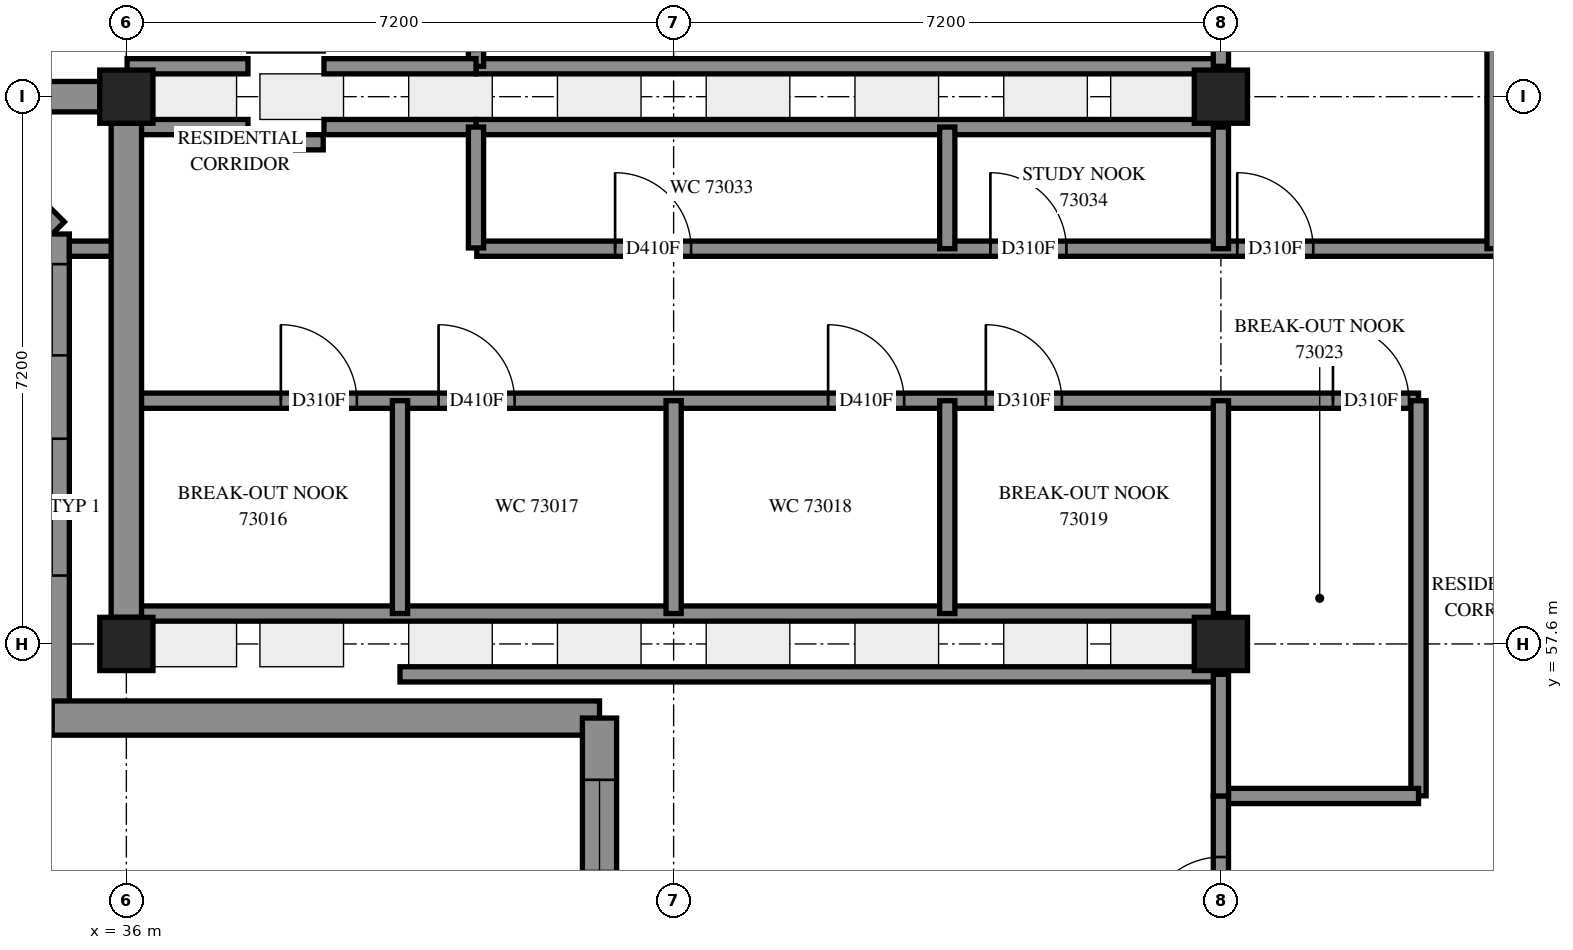
"""IFC4 building model, lengths in metres.
Left out: names, types, materials, properties, quantities, classifications, styles, units other than length and angle.
Written with IfcOpenShell. Run it as: python <this file> out.ifc"""

import sys

from ifc_helpers import new_model, si_unit, direction, frame, frame_2d, origin, origin_2d, place, context, subcontext, project, spatial, polyline, rectangle, outline, extrude, element, fill, save


model = new_model("IFC4")
c1 = context("Model", 3, precision=1e-05, world=origin(), true_north=direction((0.0, 1.0)))
c2 = subcontext(c1, "Body", "Model", "MODEL_VIEW")
j1 = project(units=[si_unit("LENGTHUNIT", "METRE"), si_unit("PLANEANGLEUNIT", "RADIAN")], contexts=[c1])
p1 = place(None, origin())
s1 = spatial("IfcSite", under=j1, at=p1, CompositionType="ELEMENT")
p2 = place(p1, origin())
s2 = spatial("IfcBuilding", under=s1, at=p2, CompositionType="ELEMENT")
p3 = place(p2, frame((0.0, 0.0, 267.6)))
s3 = spatial("IfcBuildingStorey", under=s2, at=p3, CompositionType="ELEMENT", Elevation=267.6)
for number, where, z_axis, x_axis in (
    (1, (36.0, 57.6, 0.0), (0.0, 0.0, 1.0), (1.0, 0.0, 0.0)),
    (2, (36.0, 64.8, 0.0), (0.0, 0.0, 1.0), (1.0, 0.0, 0.0)),
    (3, (50.4, 57.6, 0.0), (0.0, 0.0, 1.0), (1.0, 0.0, 0.0)),
    (4, (50.4, 64.8, 0.0), (0.0, 0.0, 1.0), (1.0, 0.0, 0.0)),
):
    element("IfcColumn", number, at=place(p3, frame(where, z_axis=z_axis, x_axis=x_axis)), inside=s3, PredefinedType="COLUMN", context=c2, shape_type="SweptSolid", body=[
        extrude(rectangle(XDim=0.7, YDim=0.7, at=origin_2d()), origin(), (0.0, 0.0, 1.0), 3.1),
    ])
p4 = place(p3, frame((34.193, 63.825, 0.0), z_axis=(0.0, 0.0, 1.0), x_axis=(0.7071067812, -0.7071067812, 0.0)))
e5 = element("IfcWall", 5, at=p4, inside=s3, PredefinedType="SOLIDWALL", context=c2, shape_type="SweptSolid", body=[
    extrude(outline(polyline([(0.093, -0.225), (1.083, -0.225), (1.27, 0.225), (-0.093, 0.225), (0.093, -0.225)])), origin(), (0.0, 0.0, 1.0), 3.1),
])
p5 = place(p3, frame((35.025, 62.993, 0.0), z_axis=(0.0, 0.0, 1.0), x_axis=(0.0, -1.0, 0.0)))
e6 = element("IfcWall", 6, at=p5, inside=s3, PredefinedType="SOLIDWALL", context=c2, shape_type="SweptSolid", body=[
    extrude(outline(polyline([(0.093, -0.225), (6.593, -0.225), (6.143, 0.225), (-0.093, 0.225), (0.093, -0.225)])), origin(), (0.0, 0.0, 1.0), 3.1),
])
p6 = place(p5, frame((0.397, 0.0, 0.45)))
e7 = element("IfcOpeningElement", 7, at=p6, cuts=e6, PredefinedType="OPENING", context=c2, shape_type="SweptSolid", body=[
    extrude(rectangle(XDim=1.2, YDim=2.55, at=frame_2d((0.6, 1.275))), frame((0.0, 0.235, 0.0), z_axis=(0.0, -1.0, 0.0), x_axis=(1.0, 0.0, 0.0)), (0.0, 0.0, 1.0), 0.47),
])
p7 = place(p5, frame((2.693, 0.0, 0.7)))
e8 = element("IfcOpeningElement", 8, at=p7, cuts=e6, PredefinedType="OPENING", context=c2, shape_type="SweptSolid", body=[
    extrude(rectangle(XDim=1.8, YDim=2.3, at=frame_2d((0.9, 1.15))), frame((0.0, 0.235, 0.0), z_axis=(0.0, -1.0, 0.0), x_axis=(1.0, 0.0, 0.0)), (0.0, 0.0, 1.0), 0.47),
])
p8 = place(p3, frame((35.025, 56.625, 0.0), z_axis=(0.0, 0.0, 1.0), x_axis=(1.0, 0.0, 0.0)))
e9 = element("IfcWall", 9, at=p8, inside=s3, PredefinedType="SOLIDWALL", context=c2, shape_type="SweptSolid", body=[
    extrude(outline(polyline([(-0.225, -0.225), (6.975, -0.225), (7.425, 0.225), (0.225, 0.225), (-0.225, -0.225)])), origin(), (0.0, 0.0, 1.0), 3.1),
])
p9 = place(p3, frame((42.225, 56.625, 0.0), z_axis=(0.0, 0.0, 1.0), x_axis=(0.0, -1.0, 0.0)))
e10 = element("IfcWall", 10, at=p9, inside=s3, PredefinedType="SOLIDWALL", context=c2, shape_type="SweptSolid", body=[
    extrude(outline(polyline([(0.225, -0.225), (7.425, -0.225), (6.975, 0.225), (-0.225, 0.225), (0.225, -0.225)])), origin(), (0.0, 0.0, 1.0), 3.1),
])
p10 = place(p9, frame((3.025, 0.0, 0.45)))
e11 = element("IfcOpeningElement", 11, at=p10, cuts=e10, PredefinedType="OPENING", context=c2, shape_type="SweptSolid", body=[
    extrude(rectangle(XDim=2.8, YDim=2.55, at=frame_2d((1.4, 1.275))), frame((0.0, 0.235, 0.0), z_axis=(0.0, -1.0, 0.0), x_axis=(1.0, 0.0, 0.0)), (0.0, 0.0, 1.0), 0.47),
])
p11 = place(p9, frame((0.812, 0.0, 0.45)))
e12 = element("IfcOpeningElement", 12, at=p11, cuts=e10, PredefinedType="OPENING", context=c2, shape_type="SweptSolid", body=[
    extrude(rectangle(XDim=1.2, YDim=2.55, at=frame_2d((0.6, 1.275))), frame((0.0, 0.235, 0.0), z_axis=(0.0, -1.0, 0.0), x_axis=(1.0, 0.0, 0.0)), (0.0, 0.0, 1.0), 0.47),
])
p12 = place(p3, frame((36.0, 60.8, 0.0), z_axis=(0.0, 0.0, 1.0), x_axis=(1.0, 0.0, 0.0)))
e13 = element("IfcWall", 13, at=p12, inside=s3, PredefinedType="PARTITIONING", context=c2, shape_type="SweptSolid", body=[
    extrude(rectangle(XDim=17.0, YDim=0.2, at=frame_2d((8.5, 0.0))), origin(), (0.0, 0.0, 1.0), 3.1),
])
p13 = place(p12, frame((2.033, 0.0, 0.0)))
e14 = element("IfcOpeningElement", 14, at=p13, cuts=e13, PredefinedType="OPENING", context=c2, shape_type="SweptSolid", body=[
    extrude(rectangle(XDim=1.0, YDim=2.1, at=frame_2d((0.5, 1.05))), frame((0.0, 0.11, 0.0), z_axis=(0.0, -1.0, 0.0), x_axis=(1.0, 0.0, 0.0)), (0.0, 0.0, 1.0), 0.22),
])
p14 = place(p12, frame((4.107, 0.0, 0.0)))
e15 = element("IfcOpeningElement", 15, at=p14, cuts=e13, PredefinedType="OPENING", context=c2, shape_type="SweptSolid", body=[
    extrude(rectangle(XDim=1.0, YDim=2.1, at=frame_2d((0.5, 1.05))), frame((0.0, 0.11, 0.0), z_axis=(0.0, -1.0, 0.0), x_axis=(1.0, 0.0, 0.0)), (0.0, 0.0, 1.0), 0.22),
])
p15 = place(p12, frame((9.232, 0.0, 0.0)))
e16 = element("IfcOpeningElement", 16, at=p15, cuts=e13, PredefinedType="OPENING", context=c2, shape_type="SweptSolid", body=[
    extrude(rectangle(XDim=1.0, YDim=2.1, at=frame_2d((0.5, 1.05))), frame((0.0, 0.11, 0.0), z_axis=(0.0, -1.0, 0.0), x_axis=(1.0, 0.0, 0.0)), (0.0, 0.0, 1.0), 0.22),
])
p16 = place(p12, frame((11.307, 0.0, 0.0)))
e17 = element("IfcOpeningElement", 17, at=p16, cuts=e13, PredefinedType="OPENING", context=c2, shape_type="SweptSolid", body=[
    extrude(rectangle(XDim=1.0, YDim=2.1, at=frame_2d((0.5, 1.05))), frame((0.0, 0.11, 0.0), z_axis=(0.0, -1.0, 0.0), x_axis=(1.0, 0.0, 0.0)), (0.0, 0.0, 1.0), 0.22),
])
p17 = place(p12, frame((15.874, 0.0, 0.0)))
e18 = element("IfcOpeningElement", 18, at=p17, cuts=e13, PredefinedType="OPENING", context=c2, shape_type="SweptSolid", body=[
    extrude(rectangle(XDim=1.0, YDim=2.1, at=frame_2d((0.5, 1.05))), frame((0.0, 0.11, 0.0), z_axis=(0.0, -1.0, 0.0), x_axis=(1.0, 0.0, 0.0)), (0.0, 0.0, 1.0), 0.22),
])
p18 = place(p3, frame((40.61, 62.8, 0.0), z_axis=(0.0, 0.0, 1.0), x_axis=(1.0, 0.0, 0.0)))
e19 = element("IfcWall", 19, at=p18, inside=s3, PredefinedType="PARTITIONING", context=c2, shape_type="SweptSolid", body=[
    extrude(rectangle(XDim=14.59, YDim=0.2, at=frame_2d((7.295, 0.0))), origin(), (0.0, 0.0, 1.0), 3.1),
])
p19 = place(p18, frame((1.82, 0.0, 0.0)))
e20 = element("IfcOpeningElement", 20, at=p19, cuts=e19, PredefinedType="OPENING", context=c2, shape_type="SweptSolid", body=[
    extrude(rectangle(XDim=1.0, YDim=2.1, at=frame_2d((0.5, 1.05))), frame((0.0, 0.11, 0.0), z_axis=(0.0, -1.0, 0.0), x_axis=(1.0, 0.0, 0.0)), (0.0, 0.0, 1.0), 0.22),
])
p20 = place(p18, frame((6.758, 0.0, 0.0)))
e21 = element("IfcOpeningElement", 21, at=p20, cuts=e19, PredefinedType="OPENING", context=c2, shape_type="SweptSolid", body=[
    extrude(rectangle(XDim=1.0, YDim=2.1, at=frame_2d((0.5, 1.05))), frame((0.0, 0.11, 0.0), z_axis=(0.0, -1.0, 0.0), x_axis=(1.0, 0.0, 0.0)), (0.0, 0.0, 1.0), 0.22),
])
p21 = place(p18, frame((10.005, 0.0, 0.0)))
e22 = element("IfcOpeningElement", 22, at=p21, cuts=e19, PredefinedType="OPENING", context=c2, shape_type="SweptSolid", body=[
    extrude(rectangle(XDim=1.0, YDim=2.1, at=frame_2d((0.5, 1.05))), frame((0.0, 0.11, 0.0), z_axis=(0.0, -1.0, 0.0), x_axis=(1.0, 0.0, 0.0)), (0.0, 0.0, 1.0), 0.22),
])
p22 = place(p3, frame((36.0, 58.0, 0.0), z_axis=(0.0, 0.0, 1.0), x_axis=(1.0, 0.0, 0.0)))
e23 = element("IfcWall", 23, at=p22, inside=s3, PredefinedType="PARTITIONING", context=c2, shape_type="SweptSolid", body=[
    extrude(rectangle(XDim=14.4, YDim=0.2, at=frame_2d((7.2, 0.0))), origin(), (0.0, 0.0, 1.0), 3.1),
])
p23 = place(p3, frame((39.6, 57.2, 0.0), z_axis=(0.0, 0.0, 1.0), x_axis=(1.0, 0.0, 0.0)))
e24 = element("IfcWall", 24, at=p23, inside=s3, PredefinedType="PARTITIONING", context=c2, shape_type="SweptSolid", body=[
    extrude(rectangle(XDim=10.8, YDim=0.2, at=frame_2d((5.4, 0.0))), origin(), (0.0, 0.0, 1.0), 3.1),
])
p24 = place(p3, frame((54.0, 62.8, 0.0), z_axis=(0.0, 0.0, 1.0), x_axis=(0.0, 1.0, 0.0)))
e25 = element("IfcWall", 25, at=p24, inside=s3, PredefinedType="PARTITIONING", context=c2, shape_type="SweptSolid", body=[
    extrude(rectangle(XDim=10.036, YDim=0.2, at=frame_2d((5.018, 0.0))), origin(), (0.0, 0.0, 1.0), 3.1),
])
for number, where, z_axis, x_axis in (
    (26, (40.6, 64.4, 0.0), (0.0, 0.0, 1.0), (1.0, 0.0, 0.0)),
    (27, (40.6, 65.2, 0.0), (0.0, 0.0, 1.0), (1.0, 0.0, 0.0)),
):
    element("IfcWall", number, at=place(p3, frame(where, z_axis=z_axis, x_axis=x_axis)), inside=s3, PredefinedType="PARTITIONING", context=c2, shape_type="SweptSolid", body=[
        extrude(rectangle(XDim=9.8, YDim=0.2, at=frame_2d((4.9, 0.0))), origin(), (0.0, 0.0, 1.0), 3.1),
    ])
p25 = place(p3, frame((50.4, 65.2, 0.0), z_axis=(0.0, 0.0, 1.0), x_axis=(0.0, 1.0, 0.0)))
e28 = element("IfcWall", 28, at=p25, inside=s3, PredefinedType="PARTITIONING", context=c2, shape_type="SweptSolid", body=[
    extrude(rectangle(XDim=6.4, YDim=0.2, at=frame_2d((3.2, 0.0))), origin(), (0.0, 0.0, 1.0), 3.1),
])
p26 = place(p3, frame((53.0, 55.602, 0.0), z_axis=(0.0, 0.0, 1.0), x_axis=(0.0, 1.0, 0.0)))
e29 = element("IfcWall", 29, at=p26, inside=s3, PredefinedType="PARTITIONING", context=c2, shape_type="SweptSolid", body=[
    extrude(rectangle(XDim=5.198, YDim=0.2, at=frame_2d((2.599, 0.0))), origin(), (0.0, 0.0, 1.0), 3.1),
])
p27 = place(p3, frame((36.0, 58.0, 0.0), z_axis=(0.0, 0.0, 1.0), x_axis=(0.0, 1.0, 0.0)))
e30 = element("IfcWall", 30, at=p27, inside=s3, PredefinedType="PARTITIONING", context=c2, shape_type="SweptSolid", body=[
    extrude(rectangle(XDim=2.8, YDim=0.2, at=frame_2d((1.4, 0.0))), origin(), (0.0, 0.0, 1.0), 2.6),
])
for number, where, z_axis, x_axis in (
    (31, (39.6, 58.0, 0.0), (0.0, 0.0, 1.0), (0.0, 1.0, 0.0)),
    (32, (43.2, 58.0, 0.0), (0.0, 0.0, 1.0), (0.0, 1.0, 0.0)),
    (33, (46.8, 58.0, 0.0), (0.0, 0.0, 1.0), (0.0, 1.0, 0.0)),
    (34, (50.4, 58.0, 0.0), (0.0, 0.0, 1.0), (0.0, 1.0, 0.0)),
):
    element("IfcWall", number, at=place(p3, frame(where, z_axis=z_axis, x_axis=x_axis)), inside=s3, PredefinedType="PARTITIONING", context=c2, shape_type="SweptSolid", body=[
        extrude(rectangle(XDim=2.8, YDim=0.2, at=frame_2d((1.4, 0.0))), origin(), (0.0, 0.0, 1.0), 3.1),
    ])
p28 = place(p3, frame((50.4, 55.6, 0.0), z_axis=(0.0, 0.0, 1.0), x_axis=(1.0, 0.0, 0.0)))
e35 = element("IfcWall", 35, at=p28, inside=s3, PredefinedType="PARTITIONING", context=c2, shape_type="SweptSolid", body=[
    extrude(rectangle(XDim=2.6, YDim=0.2, at=frame_2d((1.3, 0.0))), origin(), (0.0, 0.0, 1.0), 3.1),
])
p29 = place(p3, frame((40.6, 65.2, 0.0), z_axis=(0.0, 0.0, 1.0), x_axis=(0.0, 1.0, 0.0)))
e36 = element("IfcWall", 36, at=p29, inside=s3, PredefinedType="PARTITIONING", context=c2, shape_type="SweptSolid", body=[
    extrude(rectangle(XDim=2.298, YDim=0.2, at=frame_2d((1.149, 0.0))), origin(), (0.0, 0.0, 1.0), 3.1),
])
p30 = place(p29, frame((0.203, 0.0, 0.0)))
e37 = element("IfcOpeningElement", 37, at=p30, cuts=e36, PredefinedType="OPENING", context=c2, shape_type="SweptSolid", body=[
    extrude(rectangle(XDim=1.0, YDim=2.1, at=frame_2d((0.5, 1.05))), frame((0.0, 0.11, 0.0), z_axis=(0.0, -1.0, 0.0), x_axis=(1.0, 0.0, 0.0)), (0.0, 0.0, 1.0), 0.22),
])
for number, where, z_axis, x_axis in (
    (38, (38.6, 64.4, 0.0), (0.0, 0.0, 1.0), (1.0, 0.0, 0.0)),
    (39, (38.6, 65.2, 0.0), (0.0, 0.0, 1.0), (1.0, 0.0, 0.0)),
):
    element("IfcWall", number, at=place(p3, frame(where, z_axis=z_axis, x_axis=x_axis)), inside=s3, PredefinedType="PARTITIONING", context=c2, shape_type="SweptSolid", body=[
        extrude(rectangle(XDim=2.0, YDim=0.2, at=frame_2d((1.0, 0.0))), origin(), (0.0, 0.0, 1.0), 3.1),
    ])
p31 = place(p3, frame((50.4, 53.6, 0.0), z_axis=(0.0, 0.0, 1.0), x_axis=(0.0, 1.0, 0.0)))
e40 = element("IfcWall", 40, at=p31, inside=s3, PredefinedType="PARTITIONING", context=c2, shape_type="SweptSolid", body=[
    extrude(rectangle(XDim=2.0, YDim=0.2, at=frame_2d((1.0, 0.0))), origin(), (0.0, 0.0, 1.0), 3.1),
])
p32 = place(p31, frame((0.197, 0.0, 0.0)))
e41 = element("IfcOpeningElement", 41, at=p32, cuts=e40, PredefinedType="OPENING", context=c2, shape_type="SweptSolid", body=[
    extrude(rectangle(XDim=1.0, YDim=2.1, at=frame_2d((0.5, 1.05))), frame((0.0, 0.11, 0.0), z_axis=(0.0, -1.0, 0.0), x_axis=(1.0, 0.0, 0.0)), (0.0, 0.0, 1.0), 0.22),
])
p33 = place(p3, frame((36.0, 60.8, 0.0), z_axis=(0.0, 0.0, 1.0), x_axis=(0.0, 1.0, 0.0)))
e42 = element("IfcWall", 42, at=p33, inside=s3, PredefinedType="PARTITIONING", context=c2, shape_type="SweptSolid", body=[
    extrude(rectangle(XDim=1.988, YDim=0.2, at=frame_2d((0.994, 0.0))), origin(), (0.0, 0.0, 1.0), 2.6),
])
for number, where, z_axis, x_axis in (
    (43, (46.8, 62.8, 0.0), (0.0, 0.0, 1.0), (0.0, 1.0, 0.0)),
    (44, (50.4, 62.8, 0.0), (0.0, 0.0, 1.0), (0.0, 1.0, 0.0)),
    (45, (50.4, 55.6, 0.0), (0.0, 0.0, 1.0), (0.0, 1.0, 0.0)),
):
    element("IfcWall", number, at=place(p3, frame(where, z_axis=z_axis, x_axis=x_axis)), inside=s3, PredefinedType="PARTITIONING", context=c2, shape_type="SweptSolid", body=[
        extrude(rectangle(XDim=1.6, YDim=0.2, at=frame_2d((0.8, 0.0))), origin(), (0.0, 0.0, 1.0), 3.1),
    ])
for number, where, z_axis, x_axis in (
    (46, (36.01, 64.4, 0.0), (0.0, 0.0, 1.0), (1.0, 0.0, 0.0)),
    (47, (36.01, 65.2, 0.0), (0.0, 0.0, 1.0), (1.0, 0.0, 0.0)),
    (48, (40.6, 62.81, 0.0), (0.0, 0.0, 1.0), (0.0, 1.0, 0.0)),
):
    element("IfcWall", number, at=place(p3, frame(where, z_axis=z_axis, x_axis=x_axis)), inside=s3, PredefinedType="PARTITIONING", context=c2, shape_type="SweptSolid", body=[
        extrude(rectangle(XDim=1.59, YDim=0.2, at=frame_2d((0.795, 0.0))), origin(), (0.0, 0.0, 1.0), 3.1),
    ])
p34 = place(p3, frame((37.61, 64.2, 0.0), z_axis=(0.0, 0.0, 1.0), x_axis=(1.0, 0.0, 0.0)))
e49 = element("IfcWall", 49, at=p34, inside=s3, PredefinedType="PARTITIONING", context=c2, shape_type="SweptSolid", body=[
    extrude(rectangle(XDim=0.98, YDim=0.2, at=frame_2d((0.49, 0.0))), origin(), (0.0, 0.0, 1.0), 3.1),
])
p35 = place(p3, frame((35.25, 62.8, 0.0), z_axis=(0.0, 0.0, 1.0), x_axis=(1.0, 0.0, 0.0)))
e50 = element("IfcWall", 50, at=p35, inside=s3, PredefinedType="PARTITIONING", context=c2, shape_type="SweptSolid", body=[
    extrude(rectangle(XDim=0.74, YDim=0.2, at=frame_2d((0.37, 0.0))), origin(), (0.0, 0.0, 1.0), 3.1),
])
p36 = place(p6, origin())
e51 = element("IfcWindow", 51, at=p36, inside=s3, PartitioningType="SINGLE_PANEL", PredefinedType="WINDOW", context=c2, shape_type="SweptSolid", body=[
    extrude(rectangle(XDim=1.2, YDim=2.55, at=frame_2d((0.6, 1.275))), frame((0.0, 0.205, 0.0), z_axis=(0.0, -1.0, 0.0), x_axis=(1.0, 0.0, 0.0)), (0.0, 0.0, 1.0), 0.06),
])
fill(e7, e51)
p37 = place(p11, origin())
e52 = element("IfcWindow", 52, at=p37, inside=s3, PartitioningType="SINGLE_PANEL", PredefinedType="WINDOW", context=c2, shape_type="SweptSolid", body=[
    extrude(rectangle(XDim=1.2, YDim=2.55, at=frame_2d((0.6, 1.275))), frame((0.0, 0.205, 0.0), z_axis=(0.0, -1.0, 0.0), x_axis=(1.0, 0.0, 0.0)), (0.0, 0.0, 1.0), 0.06),
])
fill(e12, e52)
p38 = place(p13, origin())
e53 = element("IfcDoor", 53, at=p38, inside=s3, OperationType="SINGLE_SWING_LEFT", PredefinedType="DOOR", context=c2, shape_type="SweptSolid", body=[
    extrude(rectangle(XDim=1.0, YDim=2.1, at=frame_2d((0.5, 1.05))), frame((0.0, 0.025, 0.0), z_axis=(0.0, -1.0, 0.0), x_axis=(1.0, 0.0, 0.0)), (0.0, 0.0, 1.0), 0.05),
])
fill(e14, e53)
p39 = place(p14, origin())
e54 = element("IfcDoor", 54, at=p39, inside=s3, OperationType="SINGLE_SWING_RIGHT", PredefinedType="DOOR", context=c2, shape_type="SweptSolid", body=[
    extrude(rectangle(XDim=1.0, YDim=2.1, at=frame_2d((0.5, 1.05))), frame((0.0, 0.025, 0.0), z_axis=(0.0, -1.0, 0.0), x_axis=(1.0, 0.0, 0.0)), (0.0, 0.0, 1.0), 0.05),
])
fill(e15, e54)
p40 = place(p15, origin())
e55 = element("IfcDoor", 55, at=p40, inside=s3, OperationType="SINGLE_SWING_LEFT", PredefinedType="DOOR", context=c2, shape_type="SweptSolid", body=[
    extrude(rectangle(XDim=1.0, YDim=2.1, at=frame_2d((0.5, 1.05))), frame((0.0, 0.025, 0.0), z_axis=(0.0, -1.0, 0.0), x_axis=(1.0, 0.0, 0.0)), (0.0, 0.0, 1.0), 0.05),
])
fill(e16, e55)
p41 = place(p16, origin())
e56 = element("IfcDoor", 56, at=p41, inside=s3, OperationType="SINGLE_SWING_RIGHT", PredefinedType="DOOR", context=c2, shape_type="SweptSolid", body=[
    extrude(rectangle(XDim=1.0, YDim=2.1, at=frame_2d((0.5, 1.05))), frame((0.0, 0.025, 0.0), z_axis=(0.0, -1.0, 0.0), x_axis=(1.0, 0.0, 0.0)), (0.0, 0.0, 1.0), 0.05),
])
fill(e17, e56)
p42 = place(p32, origin())
e57 = element("IfcDoor", 57, at=p42, inside=s3, OperationType="SINGLE_SWING_LEFT", PredefinedType="DOOR", context=c2, shape_type="SweptSolid", body=[
    extrude(rectangle(XDim=1.0, YDim=2.1, at=frame_2d((0.5, 1.05))), frame((0.0, 0.025, 0.0), z_axis=(0.0, -1.0, 0.0), x_axis=(1.0, 0.0, 0.0)), (0.0, 0.0, 1.0), 0.05),
])
fill(e41, e57)
p43 = place(p17, origin())
e58 = element("IfcDoor", 58, at=p43, inside=s3, OperationType="SINGLE_SWING_LEFT", PredefinedType="DOOR", context=c2, shape_type="SweptSolid", body=[
    extrude(rectangle(XDim=1.0, YDim=2.1, at=frame_2d((0.5, 1.05))), frame((0.0, 0.025, 0.0), z_axis=(0.0, -1.0, 0.0), x_axis=(1.0, 0.0, 0.0)), (0.0, 0.0, 1.0), 0.05),
])
fill(e18, e58)
p44 = place(p19, origin())
e59 = element("IfcDoor", 59, at=p44, inside=s3, OperationType="SINGLE_SWING_LEFT", PredefinedType="DOOR", context=c2, shape_type="SweptSolid", body=[
    extrude(rectangle(XDim=1.0, YDim=2.1, at=frame_2d((0.5, 1.05))), frame((0.0, 0.025, 0.0), z_axis=(0.0, -1.0, 0.0), x_axis=(1.0, 0.0, 0.0)), (0.0, 0.0, 1.0), 0.05),
])
fill(e20, e59)
p45 = place(p20, origin())
e60 = element("IfcDoor", 60, at=p45, inside=s3, OperationType="SINGLE_SWING_LEFT", PredefinedType="DOOR", context=c2, shape_type="SweptSolid", body=[
    extrude(rectangle(XDim=1.0, YDim=2.1, at=frame_2d((0.5, 1.05))), frame((0.0, 0.025, 0.0), z_axis=(0.0, -1.0, 0.0), x_axis=(1.0, 0.0, 0.0)), (0.0, 0.0, 1.0), 0.05),
])
fill(e21, e60)
p46 = place(p21, origin())
e61 = element("IfcDoor", 61, at=p46, inside=s3, OperationType="SINGLE_SWING_LEFT", PredefinedType="DOOR", context=c2, shape_type="SweptSolid", body=[
    extrude(rectangle(XDim=1.0, YDim=2.1, at=frame_2d((0.5, 1.05))), frame((0.0, 0.025, 0.0), z_axis=(0.0, -1.0, 0.0), x_axis=(1.0, 0.0, 0.0)), (0.0, 0.0, 1.0), 0.05),
])
fill(e22, e61)
p47 = place(p7, origin())
e62 = element("IfcWindow", 62, at=p47, inside=s3, PartitioningType="SINGLE_PANEL", PredefinedType="WINDOW", context=c2, shape_type="SweptSolid", body=[
    extrude(rectangle(XDim=1.8, YDim=2.3, at=frame_2d((0.9, 1.15))), frame((0.0, 0.205, 0.0), z_axis=(0.0, -1.0, 0.0), x_axis=(1.0, 0.0, 0.0)), (0.0, 0.0, 1.0), 0.06),
])
fill(e8, e62)
save(model, sys.argv[1])
